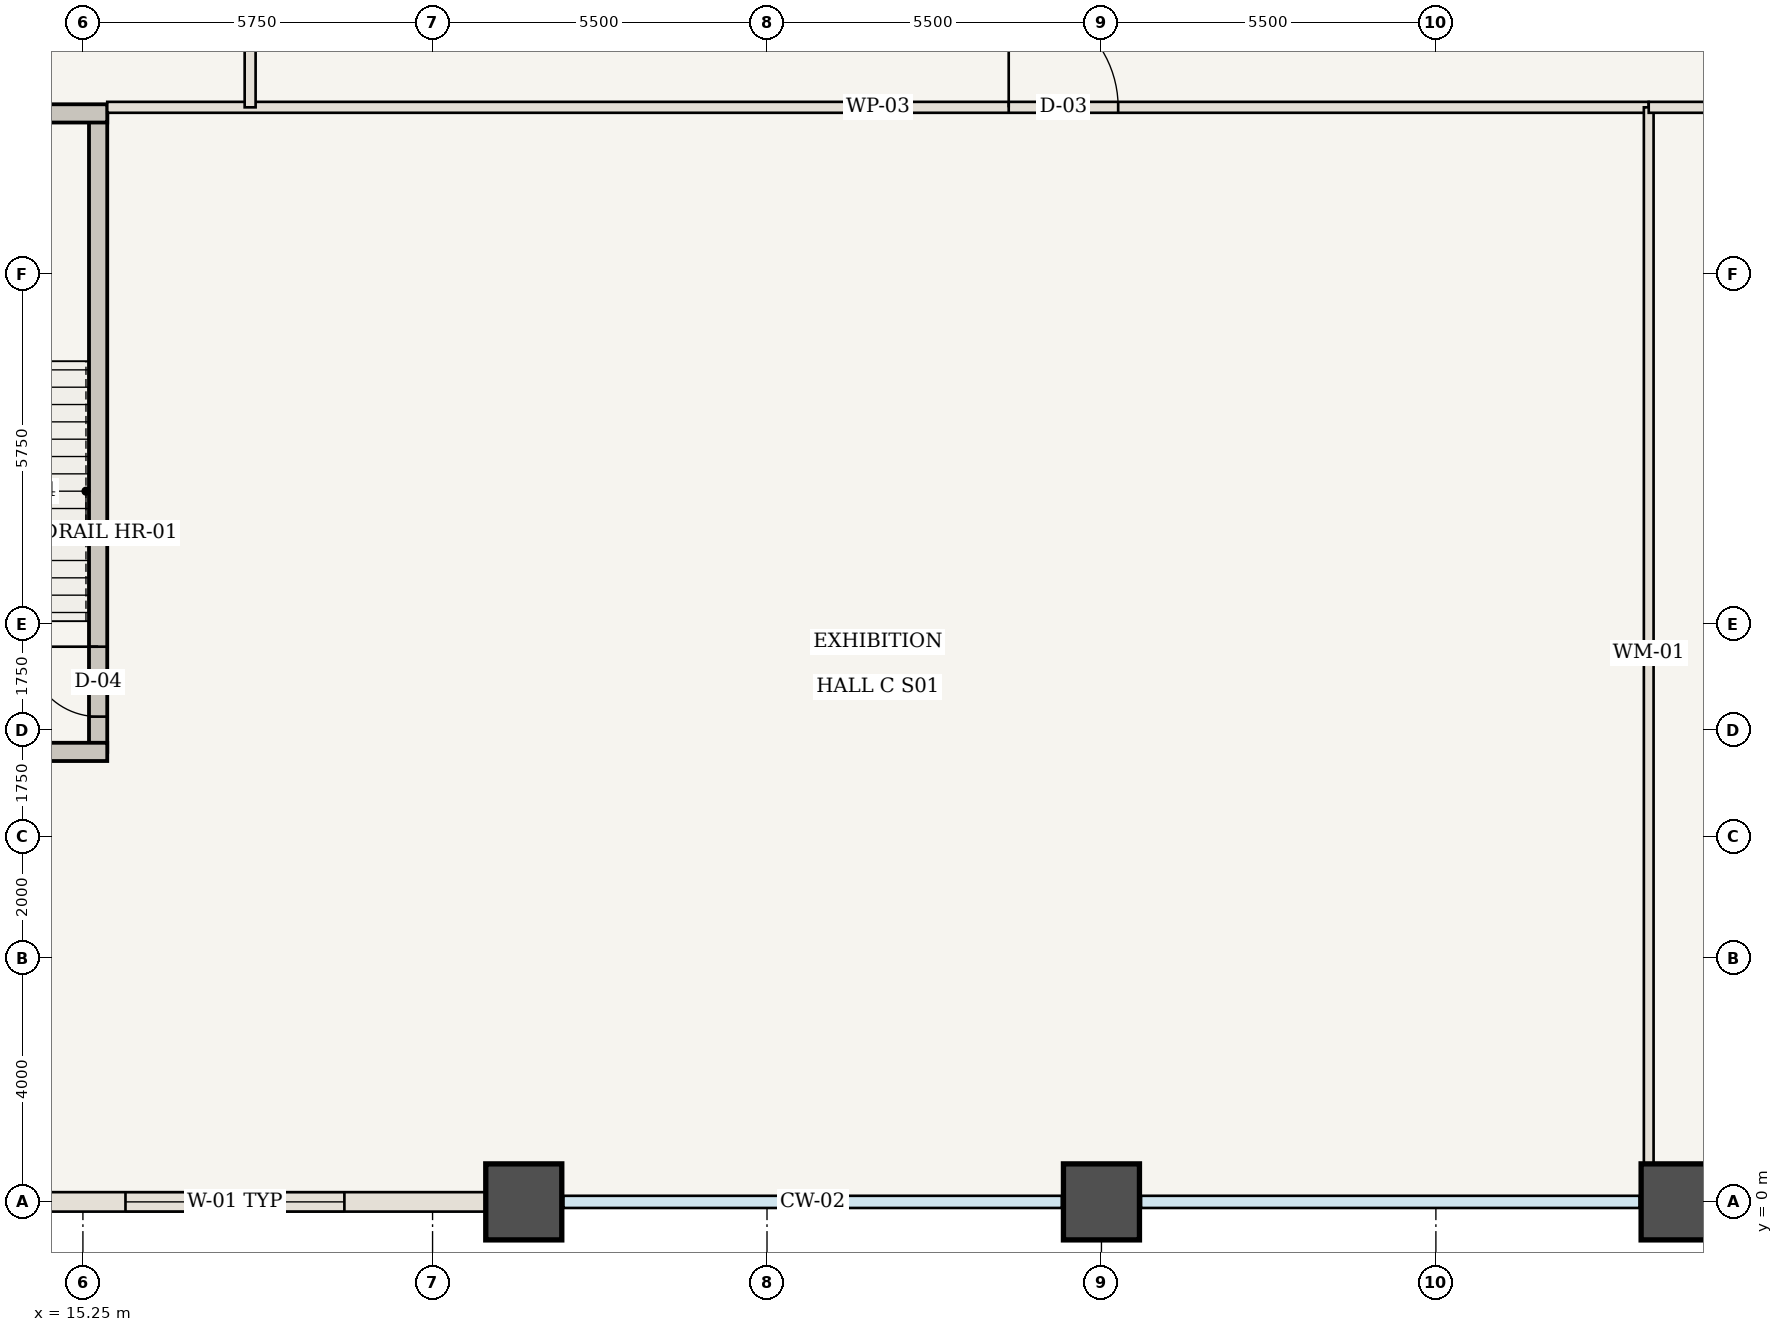
"""IFC4 building model, lengths in metres.
Left out: names, types, materials, properties, quantities, classifications, styles, units other than length and angle.
Written with IfcOpenShell. Run it as: python <this file> out.ifc"""

import sys

from ifc_helpers import new_model, si_unit, direction, frame, frame_2d, origin, origin_2d, place, context, subcontext, project, spatial, rectangle, extrude, element, fill, save


model = new_model("IFC4")
c1 = context("Model", 3, precision=1e-05, world=origin(), true_north=direction((0.0, 1.0)))
c2 = subcontext(c1, "Body", "Model", "MODEL_VIEW")
j1 = project(units=[si_unit("LENGTHUNIT", "METRE"), si_unit("PLANEANGLEUNIT", "RADIAN")], contexts=[c1])
p1 = place(None, origin())
s1 = spatial("IfcSite", under=j1, at=p1, CompositionType="ELEMENT")
p2 = place(p1, origin())
s2 = spatial("IfcBuilding", under=s1, at=p2, CompositionType="ELEMENT")
p3 = place(p2, frame((0.0, 0.0, 12.25)))
s3 = spatial("IfcBuildingStorey", under=s2, at=p3, CompositionType="ELEMENT", Elevation=12.25)
for number, where, z_axis, x_axis in (
    (1, (22.5, 0.0, 0.0), (0.0, 0.0, 1.0), (1.0, 0.0, 0.0)),
    (2, (32.0, 0.0, 0.0), (0.0, 0.0, 1.0), (1.0, 0.0, 0.0)),
    (3, (41.5, 0.0, 0.0), (0.0, 0.0, 1.0), (1.0, 0.0, 0.0)),
):
    element("IfcColumn", number, at=place(p3, frame(where, z_axis=z_axis, x_axis=x_axis)), inside=s3, PredefinedType="COLUMN", context=c2, shape_type="SweptSolid", body=[
        extrude(rectangle(XDim=1.25, YDim=1.25, at=origin_2d()), origin(), (0.0, 0.0, 1.0), 5.6),
    ])
p4 = place(p3, frame((15.5, 7.4, 0.0), z_axis=(0.0, 0.0, 1.0), x_axis=(0.0, 1.0, 0.0)))
e4 = element("IfcWall", 4, at=p4, inside=s3, PredefinedType="SHEAR", context=c2, shape_type="SweptSolid", body=[
    extrude(rectangle(XDim=10.5, YDim=0.3, at=frame_2d((5.25, 0.0))), origin(), (0.0, 0.0, 1.0), 5.36),
])
p5 = place(p4, frame((0.58, 0.0, 0.0)))
e5 = element("IfcOpeningElement", 5, at=p5, cuts=e4, PredefinedType="OPENING", context=c2, shape_type="SweptSolid", body=[
    extrude(rectangle(XDim=1.15, YDim=2.15, at=frame_2d((0.575, 1.075))), frame((0.0, 0.16, 0.0), z_axis=(0.0, -1.0, 0.0), x_axis=(1.0, 0.0, 0.0)), (0.0, 0.0, 1.0), 0.32),
])
for number, where, z_axis, x_axis in (
    (6, (10.9, 7.4, 0.0), (0.0, 0.0, 1.0), (1.0, 0.0, 0.0)),
    (7, (10.9, 17.9, 0.0), (0.0, 0.0, 1.0), (1.0, 0.0, 0.0)),
):
    element("IfcWall", number, at=place(p3, frame(where, z_axis=z_axis, x_axis=x_axis)), inside=s3, PredefinedType="SHEAR", context=c2, shape_type="SweptSolid", body=[
        extrude(rectangle(XDim=4.75, YDim=0.3, at=frame_2d((2.375, 0.0))), origin(), (0.0, 0.0, 1.0), 5.36),
    ])
p6 = place(p3, frame((15.65, 18.0, 0.0), z_axis=(0.0, 0.0, 1.0), x_axis=(1.0, 0.0, 0.0)))
e8 = element("IfcWall", 8, at=p6, inside=s3, PredefinedType="STANDARD", context=c2, shape_type="SweptSolid", body=[
    extrude(rectangle(XDim=25.35, YDim=0.18, at=frame_2d((12.675, 0.0))), origin(), (0.0, 0.0, 1.0), 5.36),
])
p7 = place(p6, frame((14.825, 0.0, 0.0)))
e9 = element("IfcOpeningElement", 9, at=p7, cuts=e8, PredefinedType="OPENING", context=c2, shape_type="SweptSolid", body=[
    extrude(rectangle(XDim=1.8, YDim=2.35, at=frame_2d((0.9, 1.175))), frame((0.0, 0.1, 0.0), z_axis=(0.0, -1.0, 0.0), x_axis=(1.0, 0.0, 0.0)), (0.0, 0.0, 1.0), 0.2),
])
p8 = place(p3, frame((41.0, 0.06, 0.0), z_axis=(0.0, 0.0, 1.0), x_axis=(0.0, 1.0, 0.0)))
e10 = element("IfcWall", 10, at=p8, inside=s3, PredefinedType="MOVABLE", context=c2, shape_type="SweptSolid", body=[
    extrude(rectangle(XDim=17.94, YDim=0.16, at=frame_2d((8.97, 0.0))), origin(), (0.0, 0.0, 1.0), 5.36),
])
p9 = place(p3, frame((41.0, 18.0, 0.0), z_axis=(0.0, 0.0, 1.0), x_axis=(1.0, 0.0, 0.0)))
e11 = element("IfcWall", 11, at=p9, inside=s3, PredefinedType="STANDARD", context=c2, shape_type="SweptSolid", body=[
    extrude(rectangle(XDim=19.5, YDim=0.18, at=frame_2d((9.75, 0.0))), origin(), (0.0, 0.0, 1.0), 5.36),
])
p10 = place(p9, frame((1.975, 0.0, 0.0)))
e12 = element("IfcOpeningElement", 12, at=p10, cuts=e11, PredefinedType="OPENING", context=c2, shape_type="SweptSolid", body=[
    extrude(rectangle(XDim=1.8, YDim=2.35, at=frame_2d((0.9, 1.175))), frame((0.0, 0.1, 0.0), z_axis=(0.0, -1.0, 0.0), x_axis=(1.0, 0.0, 0.0)), (0.0, 0.0, 1.0), 0.2),
])
p11 = place(p3, frame((18.0, 18.0, 0.0), z_axis=(0.0, 0.0, 1.0), x_axis=(0.0, 1.0, 0.0)))
e13 = element("IfcWall", 13, at=p11, inside=s3, PredefinedType="STANDARD", context=c2, shape_type="SweptSolid", body=[
    extrude(rectangle(XDim=13.2, YDim=0.18, at=frame_2d((6.6, 0.0))), origin(), (0.0, 0.0, 1.0), 5.36),
])
p12 = place(p11, frame((6.1, 0.0, 0.0)))
e14 = element("IfcOpeningElement", 14, at=p12, cuts=e13, PredefinedType="OPENING", context=c2, shape_type="SweptSolid", body=[
    extrude(rectangle(XDim=0.95, YDim=2.15, at=frame_2d((0.475, 1.075))), frame((0.0, 0.1, 0.0), z_axis=(0.0, -1.0, 0.0), x_axis=(1.0, 0.0, 0.0)), (0.0, 0.0, 1.0), 0.2),
])
p13 = place(p3, frame((22.5, 0.0, 0.0), z_axis=(0.0, 0.0, 1.0), x_axis=(-1.0, 0.0, 0.0)))
e15 = element("IfcWall", 15, at=p13, inside=s3, PredefinedType="USERDEFINED", context=c2, shape_type="SweptSolid", body=[
    extrude(rectangle(XDim=9.5, YDim=0.32, at=frame_2d((4.75, 0.0))), origin(), (0.0, 0.0, 1.0), 4.46),
])
p14 = place(p13, frame((2.95, 0.0, 0.85)))
e16 = element("IfcOpeningElement", 16, at=p14, cuts=e15, PredefinedType="OPENING", context=c2, shape_type="SweptSolid", body=[
    extrude(rectangle(XDim=3.6, YDim=2.6, at=frame_2d((1.8, 1.3))), frame((0.0, 0.17, 0.0), z_axis=(0.0, -1.0, 0.0), x_axis=(1.0, 0.0, 0.0)), (0.0, 0.0, 1.0), 0.34),
])
p15 = place(p3, frame((51.0, 0.0, 0.0), z_axis=(0.0, 0.0, 1.0), x_axis=(-1.0, 0.0, 0.0)))
e17 = element("IfcWall", 17, at=p15, inside=s3, PredefinedType="USERDEFINED", context=c2, shape_type="SweptSolid", body=[
    extrude(rectangle(XDim=9.5, YDim=0.32, at=frame_2d((4.75, 0.0))), origin(), (0.0, 0.0, 1.0), 4.46),
])
p16 = place(p15, frame((2.95, 0.0, 0.85)))
e18 = element("IfcOpeningElement", 18, at=p16, cuts=e17, PredefinedType="OPENING", context=c2, shape_type="SweptSolid", body=[
    extrude(rectangle(XDim=3.6, YDim=2.6, at=frame_2d((1.8, 1.3))), frame((0.0, 0.17, 0.0), z_axis=(0.0, -1.0, 0.0), x_axis=(1.0, 0.0, 0.0)), (0.0, 0.0, 1.0), 0.34),
])
p17 = place(p5, origin())
e19 = element("IfcDoor", 19, at=p17, inside=s3, OperationType="SINGLE_SWING_RIGHT", PredefinedType="DOOR", context=c2, shape_type="SweptSolid", body=[
    extrude(rectangle(XDim=1.15, YDim=2.15, at=frame_2d((0.575, 1.075))), frame((0.0, 0.025, 0.0), z_axis=(0.0, -1.0, 0.0), x_axis=(1.0, 0.0, 0.0)), (0.0, 0.0, 1.0), 0.05),
])
fill(e5, e19)
p18 = place(p7, origin())
e20 = element("IfcDoor", 20, at=p18, inside=s3, OperationType="SINGLE_SWING_LEFT", PredefinedType="DOOR", context=c2, shape_type="SweptSolid", body=[
    extrude(rectangle(XDim=1.8, YDim=2.35, at=frame_2d((0.9, 1.175))), frame((0.0, 0.025, 0.0), z_axis=(0.0, -1.0, 0.0), x_axis=(1.0, 0.0, 0.0)), (0.0, 0.0, 1.0), 0.05),
])
fill(e9, e20)
p19 = place(p14, origin())
e21 = element("IfcWindow", 21, at=p19, inside=s3, PartitioningType="SINGLE_PANEL", PredefinedType="WINDOW", context=c2, shape_type="SweptSolid", body=[
    extrude(rectangle(XDim=3.6, YDim=2.6, at=frame_2d((1.8, 1.3))), frame((0.0, 0.03, 0.0), z_axis=(0.0, -1.0, 0.0), x_axis=(1.0, 0.0, 0.0)), (0.0, 0.0, 1.0), 0.06),
])
fill(e16, e21)
save(model, sys.argv[1])
